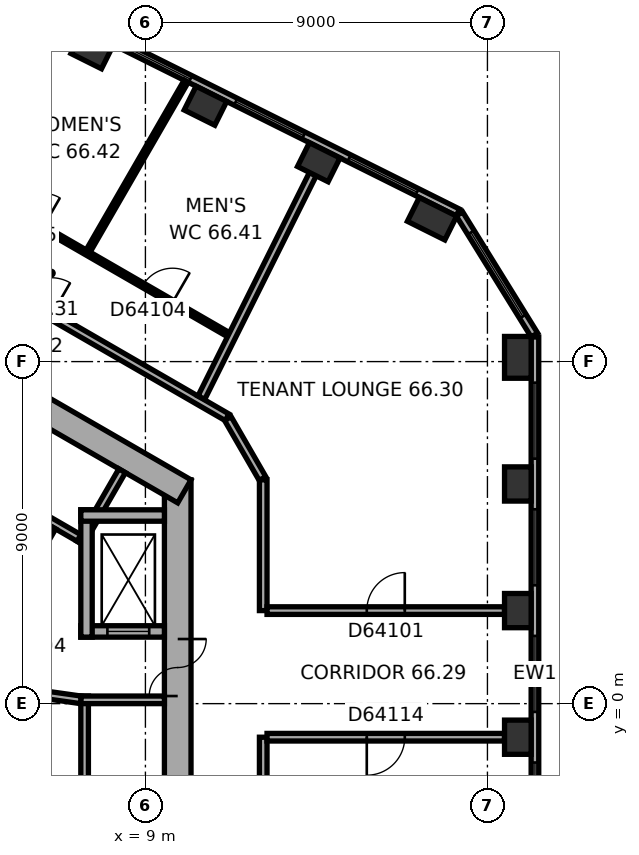
"""IFC4 building model, lengths in metres.
Left out: names, types, materials, properties, quantities, classifications, styles, units other than length and angle.
Written with IfcOpenShell. Run it as: python <this file> out.ifc"""

import sys

from ifc_helpers import new_model, si_unit, direction, frame, frame_2d, origin, origin_2d, place, context, subcontext, project, spatial, rectangle, extrude, element, fill, save


model = new_model("IFC4")
c1 = context("Model", 3, precision=1e-05, world=origin(), true_north=direction((0.0, 1.0)))
c2 = subcontext(c1, "Body", "Model", "MODEL_VIEW")
j1 = project(units=[si_unit("LENGTHUNIT", "METRE"), si_unit("PLANEANGLEUNIT", "RADIAN")], contexts=[c1])
p1 = place(None, origin())
s1 = spatial("IfcSite", under=j1, at=p1, CompositionType="ELEMENT")
p2 = place(p1, origin())
s2 = spatial("IfcBuilding", under=s1, at=p2, CompositionType="ELEMENT")
p3 = place(p2, frame((0.0, 0.0, 267.2)))
s3 = spatial("IfcBuildingStorey", under=s2, at=p3, CompositionType="ELEMENT", Elevation=267.2)
for number, where, z_axis, x_axis in (
    (1, (18.8, -0.883, 0.0), (0.0, 0.0, 1.0), (0.0, 1.0, 0.0)),
    (2, (18.8, 2.448, 0.0), (0.0, 0.0, 1.0), (0.0, 1.0, 0.0)),
    (3, (18.8, 5.78, 0.0), (0.0, 0.0, 1.0), (0.0, 1.0, 0.0)),
):
    element("IfcColumn", number, at=place(p3, frame(where, z_axis=z_axis, x_axis=x_axis)), inside=s3, PredefinedType="COLUMN", context=c2, shape_type="SweptSolid", body=[
        extrude(rectangle(XDim=0.9, YDim=0.7, at=origin_2d()), origin(), (0.0, 0.0, 1.0), 3.7),
    ])
for number, where, z_axis, x_axis in (
    (4, (18.8, 9.112, 0.0), (0.0, 0.0, 1.0), (0.0, 1.0, 0.0)),
    (5, (16.543, 12.759, 0.0), (0.0, 0.0, 1.0), (-0.895, 0.446, 0.0)),
):
    element("IfcColumn", number, at=place(p3, frame(where, z_axis=z_axis, x_axis=x_axis)), inside=s3, PredefinedType="COLUMN", context=c2, shape_type="SweptSolid", body=[
        extrude(rectangle(XDim=1.1, YDim=0.7, at=origin_2d()), origin(), (0.0, 0.0, 1.0), 3.7),
    ])
for number, where, z_axis, x_axis in (
    (6, (13.561, 14.246, 0.0), (0.0, 0.0, 1.0), (-0.895, 0.446, 0.0)),
    (7, (10.58, 15.732, 0.0), (0.0, 0.0, 1.0), (-0.895, 0.446, 0.0)),
    (8, (7.598, 17.219, 0.0), (0.0, 0.0, 1.0), (-0.895, 0.446, 0.0)),
):
    element("IfcColumn", number, at=place(p3, frame(where, z_axis=z_axis, x_axis=x_axis)), inside=s3, PredefinedType="COLUMN", context=c2, shape_type="SweptSolid", body=[
        extrude(rectangle(XDim=0.9, YDim=0.7, at=origin_2d()), origin(), (0.0, 0.0, 1.0), 3.7),
    ])
p4 = place(p3, frame((9.85, -5.889, 0.0), z_axis=(0.0, 0.0, 1.0), x_axis=(0.0, 1.0, 0.0)))
e9 = element("IfcWall", 9, at=p4, inside=s3, PredefinedType="SHEAR", context=c2, shape_type="SweptSolid", body=[
    extrude(rectangle(XDim=11.778, YDim=0.7, at=frame_2d((5.889, 0.0))), origin(), (0.0, 0.0, 1.0), 3.7),
])
p5 = place(p4, frame((6.089, 0.0, 0.0)))
e10 = element("IfcOpeningElement", 10, at=p5, cuts=e9, PredefinedType="OPENING", context=c2, shape_type="SweptSolid", body=[
    extrude(rectangle(XDim=1.5, YDim=2.1, at=frame_2d((0.75, 1.05))), frame((0.0, 0.36, 0.0), z_axis=(0.0, -1.0, 0.0), x_axis=(1.0, 0.0, 0.0)), (0.0, 0.0, 1.0), 0.72),
])
p6 = place(p4, frame((2.939, 0.0, 0.0)))
e11 = element("IfcOpeningElement", 11, at=p6, cuts=e9, PredefinedType="OPENING", context=c2, shape_type="SweptSolid", body=[
    extrude(rectangle(XDim=0.9, YDim=2.1, at=frame_2d((0.45, 1.05))), frame((0.0, 0.36, 0.0), z_axis=(0.0, -1.0, 0.0), x_axis=(1.0, 0.0, 0.0)), (0.0, 0.0, 1.0), 0.72),
])
p7 = place(p3, frame((10.025, 5.586, 0.0), z_axis=(0.0, 0.0, 1.0), x_axis=(-0.866026453023, 0.499998182661, 0.0)))
e12 = element("IfcWall", 12, at=p7, inside=s3, PredefinedType="SHEAR", context=c2, shape_type="SweptSolid", body=[
    extrude(rectangle(XDim=11.778, YDim=0.7, at=frame_2d((5.889, 0.0))), origin(), (0.0, 0.0, 1.0), 3.7),
])
p8 = place(p7, frame((5.139, 0.0, 0.0)))
e13 = element("IfcOpeningElement", 13, at=p8, cuts=e12, PredefinedType="OPENING", context=c2, shape_type="SweptSolid", body=[
    extrude(rectangle(XDim=0.9, YDim=2.1, at=frame_2d((0.45, 1.05))), frame((0.0, 0.36, 0.0), z_axis=(0.0, -1.0, 0.0), x_axis=(1.0, 0.0, 0.0)), (0.0, 0.0, 1.0), 0.72),
])
p9 = place(p3, frame((19.25, -8.084, 0.0), z_axis=(0.0, 0.0, 1.0), x_axis=(0.0, 1.0, 0.0)))
e14 = element("IfcWall", 14, at=p9, inside=s3, PredefinedType="STANDARD", context=c2, shape_type="SweptSolid", body=[
    extrude(rectangle(XDim=17.731, YDim=0.2, at=frame_2d((8.866, 0.0))), origin(), (0.0, 0.0, 1.0), 3.7),
])
p10 = place(p9, frame((1.203, 0.0, 0.9)))
e15 = element("IfcOpeningElement", 15, at=p10, cuts=e14, PredefinedType="OPENING", context=c2, shape_type="SweptSolid", body=[
    extrude(rectangle(XDim=2.0, YDim=2.0, at=frame_2d((1.0, 1.0))), frame((0.0, 0.11, 0.0), z_axis=(0.0, -1.0, 0.0), x_axis=(1.0, 0.0, 0.0)), (0.0, 0.0, 1.0), 0.22),
])
p11 = place(p9, frame((4.535, 0.0, 0.9)))
e16 = element("IfcOpeningElement", 16, at=p11, cuts=e14, PredefinedType="OPENING", context=c2, shape_type="SweptSolid", body=[
    extrude(rectangle(XDim=2.0, YDim=2.0, at=frame_2d((1.0, 1.0))), frame((0.0, 0.11, 0.0), z_axis=(0.0, -1.0, 0.0), x_axis=(1.0, 0.0, 0.0)), (0.0, 0.0, 1.0), 0.22),
])
p12 = place(p9, frame((7.866, 0.0, 0.9)))
e17 = element("IfcOpeningElement", 17, at=p12, cuts=e14, PredefinedType="OPENING", context=c2, shape_type="SweptSolid", body=[
    extrude(rectangle(XDim=2.0, YDim=2.0, at=frame_2d((1.0, 1.0))), frame((0.0, 0.11, 0.0), z_axis=(0.0, -1.0, 0.0), x_axis=(1.0, 0.0, 0.0)), (0.0, 0.0, 1.0), 0.22),
])
p13 = place(p9, frame((11.198, 0.0, 0.9)))
e18 = element("IfcOpeningElement", 18, at=p13, cuts=e14, PredefinedType="OPENING", context=c2, shape_type="SweptSolid", body=[
    extrude(rectangle(XDim=2.0, YDim=2.0, at=frame_2d((1.0, 1.0))), frame((0.0, 0.11, 0.0), z_axis=(0.0, -1.0, 0.0), x_axis=(1.0, 0.0, 0.0)), (0.0, 0.0, 1.0), 0.22),
])
p14 = place(p9, frame((14.53, 0.0, 0.9)))
e19 = element("IfcOpeningElement", 19, at=p14, cuts=e14, PredefinedType="OPENING", context=c2, shape_type="SweptSolid", body=[
    extrude(rectangle(XDim=2.0, YDim=2.0, at=frame_2d((1.0, 1.0))), frame((0.0, 0.11, 0.0), z_axis=(0.0, -1.0, 0.0), x_axis=(1.0, 0.0, 0.0)), (0.0, 0.0, 1.0), 0.22),
])
p15 = place(p3, frame((19.235, 9.7, 0.0), z_axis=(0.0, 0.0, 1.0), x_axis=(-0.526233475464, 0.850340125656, 0.0)))
e20 = element("IfcWall", 20, at=p15, inside=s3, PredefinedType="STANDARD", context=c2, shape_type="SweptSolid", body=[
    extrude(rectangle(XDim=3.747, YDim=0.2, at=frame_2d((1.874, 0.0))), origin(), (0.0, 0.0, 1.0), 3.7),
])
p16 = place(p15, frame((0.573, 0.0, 0.9)))
e21 = element("IfcOpeningElement", 21, at=p16, cuts=e20, PredefinedType="OPENING", context=c2, shape_type="SweptSolid", body=[
    extrude(rectangle(XDim=2.6, YDim=2.0, at=frame_2d((1.3, 1.0))), frame((0.0, 0.11, 0.0), z_axis=(0.0, -1.0, 0.0), x_axis=(1.0, 0.0, 0.0)), (0.0, 0.0, 1.0), 0.22),
])
p17 = place(p3, frame((17.223, 12.923, 0.0), z_axis=(0.0, 0.0, 1.0), x_axis=(-0.894930561148, 0.44620543556, 0.0)))
e22 = element("IfcWall", 22, at=p17, inside=s3, PredefinedType="STANDARD", context=c2, shape_type="SweptSolid", body=[
    extrude(rectangle(XDim=17.731, YDim=0.2, at=frame_2d((8.866, 0.0))), origin(), (0.0, 0.0, 1.0), 3.7),
])
p18 = place(p17, frame((1.202, 0.0, 0.9)))
e23 = element("IfcOpeningElement", 23, at=p18, cuts=e22, PredefinedType="OPENING", context=c2, shape_type="SweptSolid", body=[
    extrude(rectangle(XDim=2.0, YDim=2.0, at=frame_2d((1.0, 1.0))), frame((0.0, 0.11, 0.0), z_axis=(0.0, -1.0, 0.0), x_axis=(1.0, 0.0, 0.0)), (0.0, 0.0, 1.0), 0.22),
])
p19 = place(p17, frame((4.533, 0.0, 0.9)))
e24 = element("IfcOpeningElement", 24, at=p19, cuts=e22, PredefinedType="OPENING", context=c2, shape_type="SweptSolid", body=[
    extrude(rectangle(XDim=2.0, YDim=2.0, at=frame_2d((1.0, 1.0))), frame((0.0, 0.11, 0.0), z_axis=(0.0, -1.0, 0.0), x_axis=(1.0, 0.0, 0.0)), (0.0, 0.0, 1.0), 0.22),
])
p20 = place(p17, frame((7.865, 0.0, 0.9)))
e25 = element("IfcOpeningElement", 25, at=p20, cuts=e22, PredefinedType="OPENING", context=c2, shape_type="SweptSolid", body=[
    extrude(rectangle(XDim=2.0, YDim=2.0, at=frame_2d((1.0, 1.0))), frame((0.0, 0.11, 0.0), z_axis=(0.0, -1.0, 0.0), x_axis=(1.0, 0.0, 0.0)), (0.0, 0.0, 1.0), 0.22),
])
p21 = place(p17, frame((11.197, 0.0, 0.9)))
e26 = element("IfcOpeningElement", 26, at=p21, cuts=e22, PredefinedType="OPENING", context=c2, shape_type="SweptSolid", body=[
    extrude(rectangle(XDim=2.0, YDim=2.0, at=frame_2d((1.0, 1.0))), frame((0.0, 0.11, 0.0), z_axis=(0.0, -1.0, 0.0), x_axis=(1.0, 0.0, 0.0)), (0.0, 0.0, 1.0), 0.22),
])
p22 = place(p17, frame((14.528, 0.0, 0.9)))
e27 = element("IfcOpeningElement", 27, at=p22, cuts=e22, PredefinedType="OPENING", context=c2, shape_type="SweptSolid", body=[
    extrude(rectangle(XDim=2.0, YDim=2.0, at=frame_2d((1.0, 1.0))), frame((0.0, 0.11, 0.0), z_axis=(0.0, -1.0, 0.0), x_axis=(1.0, 0.0, 0.0)), (0.0, 0.0, 1.0), 0.22),
])
p23 = place(p3, frame((7.4, -5.2, 0.0), z_axis=(0.0, 0.0, 1.0), x_axis=(0.0, 1.0, 0.0)))
e28 = element("IfcWall", 28, at=p23, inside=s3, PredefinedType="PARTITIONING", context=c2, shape_type="SweptSolid", body=[
    extrude(rectangle(XDim=5.4, YDim=0.2, at=frame_2d((2.7, 0.0))), origin(), (0.0, 0.0, 1.0), 3.42),
])
p24 = place(p3, frame((7.3, 0.1, 0.0), z_axis=(0.0, 0.0, 1.0), x_axis=(1.0, 0.0, 0.0)))
e29 = element("IfcWall", 29, at=p24, inside=s3, PredefinedType="PARTITIONING", context=c2, shape_type="SweptSolid", body=[
    extrude(rectangle(XDim=2.2, YDim=0.2, at=frame_2d((1.1, 0.0))), origin(), (0.0, 0.0, 1.0), 3.42),
])
p25 = place(p3, frame((7.424, 4.259, 0.0), z_axis=(0.0, 0.0, 1.0), x_axis=(-0.866026010844, 0.49999894854, 0.0)))
e30 = element("IfcWall", 30, at=p25, inside=s3, PredefinedType="PARTITIONING", context=c2, shape_type="SweptSolid", body=[
    extrude(rectangle(XDim=8.0, YDim=0.2, at=frame_2d((4.0, 0.0))), origin(), (0.0, 0.0, 1.0), 3.42),
])
p26 = place(p3, frame((7.287, 4.222, 0.0), z_axis=(0.0, 0.0, 1.0), x_axis=(0.499946605688, 0.86605622881, 0.0)))
e31 = element("IfcWall", 31, at=p26, inside=s3, PredefinedType="PARTITIONING", context=c2, shape_type="SweptSolid", body=[
    extrude(rectangle(XDim=2.2, YDim=0.2, at=frame_2d((1.1, 0.0))), origin(), (0.0, 0.0, 1.0), 3.42),
])
p27 = place(p3, frame((4.158, 0.602, 0.0), z_axis=(0.0, 0.0, 1.0), x_axis=(0.499977259774, 0.866038532462, 0.0)))
e32 = element("IfcWall", 32, at=p27, inside=s3, PredefinedType="SHEAR", context=c2, shape_type="SweptSolid", body=[
    extrude(rectangle(XDim=4.7, YDim=0.3, at=frame_2d((2.35, 0.0))), origin(), (0.0, 0.0, 1.0), 3.42),
])
p28 = place(p27, frame((0.8, 0.0, 0.0)))
e33 = element("IfcOpeningElement", 33, at=p28, cuts=e32, PredefinedType="OPENING", context=c2, shape_type="SweptSolid", body=[
    extrude(rectangle(XDim=1.2, YDim=2.1, at=frame_2d((0.6, 1.05))), frame((0.0, 0.16, 0.0), z_axis=(0.0, -1.0, 0.0), x_axis=(1.0, 0.0, 0.0)), (0.0, 0.0, 1.0), 0.32),
])
p29 = place(p3, frame((4.816, -0.222, 0.0), z_axis=(0.0, 0.0, 1.0), x_axis=(0.499977259774, -0.866038532462, 0.0)))
e34 = element("IfcWall", 34, at=p29, inside=s3, PredefinedType="SHEAR", context=c2, shape_type="SweptSolid", body=[
    extrude(rectangle(XDim=4.7, YDim=0.3, at=frame_2d((2.35, 0.0))), origin(), (0.0, 0.0, 1.0), 3.42),
])
p30 = place(p3, frame((7.3, 1.9, 0.0), z_axis=(0.0, 0.0, 1.0), x_axis=(1.0, 0.0, 0.0)))
e35 = element("IfcWall", 35, at=p30, inside=s3, PredefinedType="SHEAR", context=c2, shape_type="SweptSolid", body=[
    extrude(rectangle(XDim=2.2, YDim=0.3, at=frame_2d((1.1, 0.0))), origin(), (0.0, 0.0, 1.0), 3.42),
])
p31 = place(p30, frame((0.7, 0.0, 0.0)))
e36 = element("IfcOpeningElement", 36, at=p31, cuts=e35, PredefinedType="OPENING", context=c2, shape_type="SweptSolid", body=[
    extrude(rectangle(XDim=1.1, YDim=2.1, at=frame_2d((0.55, 1.05))), frame((0.0, 0.16, 0.0), z_axis=(0.0, -1.0, 0.0), x_axis=(1.0, 0.0, 0.0)), (0.0, 0.0, 1.0), 0.32),
])
p32 = place(p3, frame((7.45, 1.75, 0.0), z_axis=(0.0, 0.0, 1.0), x_axis=(0.0, 1.0, 0.0)))
e37 = element("IfcWall", 37, at=p32, inside=s3, PredefinedType="SHEAR", context=c2, shape_type="SweptSolid", body=[
    extrude(rectangle(XDim=3.35, YDim=0.3, at=frame_2d((1.675, 0.0))), origin(), (0.0, 0.0, 1.0), 3.42),
])
p33 = place(p3, frame((7.3, 4.95, 0.0), z_axis=(0.0, 0.0, 1.0), x_axis=(1.0, 0.0, 0.0)))
e38 = element("IfcWall", 38, at=p33, inside=s3, PredefinedType="SHEAR", context=c2, shape_type="SweptSolid", body=[
    extrude(rectangle(XDim=2.2, YDim=0.3, at=frame_2d((1.1, 0.0))), origin(), (0.0, 0.0, 1.0), 3.42),
])
p34 = place(p3, frame((4.327, 0.521, 0.0), z_axis=(0.0, 0.0, 1.0), x_axis=(0.990124376366, -0.14019172346, 0.0)))
e39 = element("IfcWall", 39, at=p34, inside=s3, PredefinedType="PARTITIONING", context=c2, shape_type="SweptSolid", body=[
    extrude(rectangle(XDim=3.002, YDim=0.2, at=frame_2d((1.501, 0.0))), origin(), (0.0, 0.0, 1.0), 3.42),
])
p35 = place(p34, frame((1.15, 0.0, 0.0)))
e40 = element("IfcOpeningElement", 40, at=p35, cuts=e39, PredefinedType="OPENING", context=c2, shape_type="SweptSolid", body=[
    extrude(rectangle(XDim=0.9, YDim=2.1, at=frame_2d((0.45, 1.05))), frame((0.0, 0.11, 0.0), z_axis=(0.0, -1.0, 0.0), x_axis=(1.0, 0.0, 0.0)), (0.0, 0.0, 1.0), 0.22),
])
p36 = place(p3, frame((10.072, 16.376, 0.0), z_axis=(0.0, 0.0, 1.0), x_axis=(-0.499972385701, -0.86604134632, 0.0)))
e41 = element("IfcWall", 41, at=p36, inside=s3, PredefinedType="PARTITIONING", context=c2, shape_type="SweptSolid", body=[
    extrude(rectangle(XDim=5.158, YDim=0.12, at=frame_2d((2.579, 0.0))), origin(), (0.0, 0.0, 1.0), 2.87),
])
p37 = place(p3, frame((11.15, 7.534, 0.0), z_axis=(0.0, 0.0, 1.0), x_axis=(-0.866026603062, 0.499997922785, 0.0)))
e42 = element("IfcWall", 42, at=p37, inside=s3, PredefinedType="PARTITIONING", context=c2, shape_type="SweptSolid", body=[
    extrude(rectangle(XDim=11.738, YDim=0.2, at=frame_2d((5.869, 0.0))), origin(), (0.0, 0.0, 1.0), 3.42),
])
p38 = place(p37, frame((5.345, 0.0, 0.0)))
e43 = element("IfcOpeningElement", 43, at=p38, cuts=e42, PredefinedType="OPENING", context=c2, shape_type="SweptSolid", body=[
    extrude(rectangle(XDim=1.0, YDim=2.1, at=frame_2d((0.5, 1.05))), frame((0.0, 0.11, 0.0), z_axis=(0.0, -1.0, 0.0), x_axis=(1.0, 0.0, 0.0)), (0.0, 0.0, 1.0), 0.22),
])
p39 = place(p3, frame((11.187, 9.707, 0.0), z_axis=(0.0, 0.0, 1.0), x_axis=(-0.866033133531, 0.499986611447, 0.0)))
e44 = element("IfcWall", 44, at=p39, inside=s3, PredefinedType="PARTITIONING", context=c2, shape_type="SweptSolid", body=[
    extrude(rectangle(XDim=9.814, YDim=0.12, at=frame_2d((4.907, 0.0))), origin(), (0.0, 0.0, 1.0), 3.42),
])
p40 = place(p39, frame((8.349, 0.0, 0.0)))
e45 = element("IfcOpeningElement", 45, at=p40, cuts=e44, PredefinedType="OPENING", context=c2, shape_type="SweptSolid", body=[
    extrude(rectangle(XDim=1.0, YDim=2.1, at=frame_2d((0.5, 1.05))), frame((0.0, 0.07, 0.0), z_axis=(0.0, -1.0, 0.0), x_axis=(1.0, 0.0, 0.0)), (0.0, 0.0, 1.0), 0.14),
])
p41 = place(p39, frame((1.7, 0.0, 0.0)))
e46 = element("IfcOpeningElement", 46, at=p41, cuts=e44, PredefinedType="OPENING", context=c2, shape_type="SweptSolid", body=[
    extrude(rectangle(XDim=0.9, YDim=2.1, at=frame_2d((0.45, 1.05))), frame((0.0, 0.07, 0.0), z_axis=(0.0, -1.0, 0.0), x_axis=(1.0, 0.0, 0.0)), (0.0, 0.0, 1.0), 0.14),
])
p42 = place(p39, frame((5.642, 0.0, 0.0)))
e47 = element("IfcOpeningElement", 47, at=p42, cuts=e44, PredefinedType="OPENING", context=c2, shape_type="SweptSolid", body=[
    extrude(rectangle(XDim=0.9, YDim=2.1, at=frame_2d((0.45, 1.05))), frame((0.0, 0.07, 0.0), z_axis=(0.0, -1.0, 0.0), x_axis=(1.0, 0.0, 0.0)), (0.0, 0.0, 1.0), 0.14),
])
p43 = place(p3, frame((12.08, 5.924, 0.0), z_axis=(0.0, 0.0, 1.0), x_axis=(-0.500004960326, 0.86602253992, 0.0)))
e48 = element("IfcWall", 48, at=p43, inside=s3, PredefinedType="PARTITIONING", context=c2, shape_type="SweptSolid", body=[
    extrude(rectangle(XDim=1.82, YDim=0.2, at=frame_2d((0.91, 0.0))), origin(), (0.0, 0.0, 1.0), 3.42),
])
p44 = place(p3, frame((12.1, -5.849, 0.0), z_axis=(0.0, 0.0, 1.0), x_axis=(0.0, 1.0, 0.0)))
e49 = element("IfcWall", 49, at=p44, inside=s3, PredefinedType="PARTITIONING", context=c2, shape_type="SweptSolid", body=[
    extrude(rectangle(XDim=4.966, YDim=0.2, at=frame_2d((2.483, 0.0))), origin(), (0.0, 0.0, 1.0), 3.42),
])
p45 = place(p3, frame((12.1, 2.448, 0.0), z_axis=(0.0, 0.0, 1.0), x_axis=(0.0, 1.0, 0.0)))
e50 = element("IfcWall", 50, at=p45, inside=s3, PredefinedType="PARTITIONING", context=c2, shape_type="SweptSolid", body=[
    extrude(rectangle(XDim=3.441, YDim=0.2, at=frame_2d((1.72, 0.0))), origin(), (0.0, 0.0, 1.0), 3.42),
])
p46 = place(p3, frame((12.2, -0.883, 0.0), z_axis=(0.0, 0.0, 1.0), x_axis=(1.0, 0.0, 0.0)))
e51 = element("IfcWall", 51, at=p46, inside=s3, PredefinedType="PARTITIONING", context=c2, shape_type="SweptSolid", body=[
    extrude(rectangle(XDim=6.25, YDim=0.2, at=frame_2d((3.125, 0.0))), origin(), (0.0, 0.0, 1.0), 2.87),
])
p47 = place(p46, frame((2.625, 0.0, 0.0)))
e52 = element("IfcOpeningElement", 52, at=p47, cuts=e51, PredefinedType="OPENING", context=c2, shape_type="SweptSolid", body=[
    extrude(rectangle(XDim=1.0, YDim=2.1, at=frame_2d((0.5, 1.05))), frame((0.0, 0.11, 0.0), z_axis=(0.0, -1.0, 0.0), x_axis=(1.0, 0.0, 0.0)), (0.0, 0.0, 1.0), 0.22),
])
p48 = place(p3, frame((13.405, 13.933, 0.0), z_axis=(0.0, 0.0, 1.0), x_axis=(-0.446187838644, -0.894939334618, 0.0)))
e53 = element("IfcWall", 53, at=p48, inside=s3, PredefinedType="PARTITIONING", context=c2, shape_type="SweptSolid", body=[
    extrude(rectangle(XDim=6.571, YDim=0.2, at=frame_2d((3.286, 0.0))), origin(), (0.0, 0.0, 1.0), 3.42),
])
p49 = place(p3, frame((18.45, 2.448, 0.0), z_axis=(0.0, 0.0, 1.0), x_axis=(-1.0, 0.0, 0.0)))
e54 = element("IfcWall", 54, at=p49, inside=s3, PredefinedType="PARTITIONING", context=c2, shape_type="SweptSolid", body=[
    extrude(rectangle(XDim=6.25, YDim=0.2, at=frame_2d((3.125, 0.0))), origin(), (0.0, 0.0, 1.0), 3.42),
])
p50 = place(p49, frame((2.625, 0.0, 0.0)))
e55 = element("IfcOpeningElement", 55, at=p50, cuts=e54, PredefinedType="OPENING", context=c2, shape_type="SweptSolid", body=[
    extrude(rectangle(XDim=1.0, YDim=2.1, at=frame_2d((0.5, 1.05))), frame((0.0, 0.11, 0.0), z_axis=(0.0, -1.0, 0.0), x_axis=(1.0, 0.0, 0.0)), (0.0, 0.0, 1.0), 0.22),
])
p51 = place(p11, origin())
e56 = element("IfcWindow", 56, at=p51, inside=s3, PartitioningType="SINGLE_PANEL", PredefinedType="WINDOW", context=c2, shape_type="SweptSolid", body=[
    extrude(rectangle(XDim=2.0, YDim=2.0, at=frame_2d((1.0, 1.0))), frame((0.0, 0.03, 0.0), z_axis=(0.0, -1.0, 0.0), x_axis=(1.0, 0.0, 0.0)), (0.0, 0.0, 1.0), 0.06),
])
fill(e16, e56)
p52 = place(p12, origin())
e57 = element("IfcWindow", 57, at=p52, inside=s3, PartitioningType="SINGLE_PANEL", PredefinedType="WINDOW", context=c2, shape_type="SweptSolid", body=[
    extrude(rectangle(XDim=2.0, YDim=2.0, at=frame_2d((1.0, 1.0))), frame((0.0, 0.03, 0.0), z_axis=(0.0, -1.0, 0.0), x_axis=(1.0, 0.0, 0.0)), (0.0, 0.0, 1.0), 0.06),
])
fill(e17, e57)
p53 = place(p13, origin())
e58 = element("IfcWindow", 58, at=p53, inside=s3, PartitioningType="SINGLE_PANEL", PredefinedType="WINDOW", context=c2, shape_type="SweptSolid", body=[
    extrude(rectangle(XDim=2.0, YDim=2.0, at=frame_2d((1.0, 1.0))), frame((0.0, 0.03, 0.0), z_axis=(0.0, -1.0, 0.0), x_axis=(1.0, 0.0, 0.0)), (0.0, 0.0, 1.0), 0.06),
])
fill(e18, e58)
p54 = place(p14, origin())
e59 = element("IfcWindow", 59, at=p54, inside=s3, PartitioningType="SINGLE_PANEL", PredefinedType="WINDOW", context=c2, shape_type="SweptSolid", body=[
    extrude(rectangle(XDim=2.0, YDim=2.0, at=frame_2d((1.0, 1.0))), frame((0.0, 0.03, 0.0), z_axis=(0.0, -1.0, 0.0), x_axis=(1.0, 0.0, 0.0)), (0.0, 0.0, 1.0), 0.06),
])
fill(e19, e59)
p55 = place(p16, origin())
e60 = element("IfcWindow", 60, at=p55, inside=s3, PartitioningType="SINGLE_PANEL", PredefinedType="WINDOW", context=c2, shape_type="SweptSolid", body=[
    extrude(rectangle(XDim=2.6, YDim=2.0, at=frame_2d((1.3, 1.0))), frame((0.0, 0.03, 0.0), z_axis=(0.0, -1.0, 0.0), x_axis=(1.0, 0.0, 0.0)), (0.0, 0.0, 1.0), 0.06),
])
fill(e21, e60)
p56 = place(p18, origin())
e61 = element("IfcWindow", 61, at=p56, inside=s3, PartitioningType="SINGLE_PANEL", PredefinedType="WINDOW", context=c2, shape_type="SweptSolid", body=[
    extrude(rectangle(XDim=2.0, YDim=2.0, at=frame_2d((1.0, 1.0))), frame((0.0, 0.03, 0.0), z_axis=(0.0, -1.0, 0.0), x_axis=(1.0, 0.0, 0.0)), (0.0, 0.0, 1.0), 0.06),
])
fill(e23, e61)
p57 = place(p19, origin())
e62 = element("IfcWindow", 62, at=p57, inside=s3, PartitioningType="SINGLE_PANEL", PredefinedType="WINDOW", context=c2, shape_type="SweptSolid", body=[
    extrude(rectangle(XDim=2.0, YDim=2.0, at=frame_2d((1.0, 1.0))), frame((0.0, 0.03, 0.0), z_axis=(0.0, -1.0, 0.0), x_axis=(1.0, 0.0, 0.0)), (0.0, 0.0, 1.0), 0.06),
])
fill(e24, e62)
p58 = place(p20, origin())
e63 = element("IfcWindow", 63, at=p58, inside=s3, PartitioningType="SINGLE_PANEL", PredefinedType="WINDOW", context=c2, shape_type="SweptSolid", body=[
    extrude(rectangle(XDim=2.0, YDim=2.0, at=frame_2d((1.0, 1.0))), frame((0.0, 0.03, 0.0), z_axis=(0.0, -1.0, 0.0), x_axis=(1.0, 0.0, 0.0)), (0.0, 0.0, 1.0), 0.06),
])
fill(e25, e63)
p59 = place(p5, origin())
e64 = element("IfcDoor", 64, at=p59, inside=s3, OperationType="DOUBLE_DOOR_SINGLE_SWING", PredefinedType="DOOR", context=c2, shape_type="SweptSolid", body=[
    extrude(rectangle(XDim=1.5, YDim=2.1, at=frame_2d((0.75, 1.05))), frame((0.0, 0.025, 0.0), z_axis=(0.0, -1.0, 0.0), x_axis=(1.0, 0.0, 0.0)), (0.0, 0.0, 1.0), 0.05),
])
fill(e10, e64)
p60 = place(p31, origin())
e65 = element("IfcDoor", 65, at=p60, inside=s3, OperationType="DOUBLE_DOOR_SLIDING", PredefinedType="DOOR", context=c2, shape_type="SweptSolid", body=[
    extrude(rectangle(XDim=1.1, YDim=2.1, at=frame_2d((0.55, 1.05))), frame((0.0, 0.025, 0.0), z_axis=(0.0, -1.0, 0.0), x_axis=(1.0, 0.0, 0.0)), (0.0, 0.0, 1.0), 0.05),
])
fill(e36, e65)
p61 = place(p50, origin())
e66 = element("IfcDoor", 66, at=p61, inside=s3, OperationType="SINGLE_SWING_LEFT", PredefinedType="DOOR", context=c2, shape_type="SweptSolid", body=[
    extrude(rectangle(XDim=1.0, YDim=2.1, at=frame_2d((0.5, 1.05))), frame((0.0, 0.025, 0.0), z_axis=(0.0, -1.0, 0.0), x_axis=(1.0, 0.0, 0.0)), (0.0, 0.0, 1.0), 0.05),
])
fill(e55, e66)
p62 = place(p41, origin())
e67 = element("IfcDoor", 67, at=p62, inside=s3, OperationType="SINGLE_SWING_LEFT", PredefinedType="DOOR", context=c2, shape_type="SweptSolid", body=[
    extrude(rectangle(XDim=0.9, YDim=2.1, at=frame_2d((0.45, 1.05))), frame((0.0, 0.025, 0.0), z_axis=(0.0, -1.0, 0.0), x_axis=(1.0, 0.0, 0.0)), (0.0, 0.0, 1.0), 0.05),
])
fill(e46, e67)
p63 = place(p47, origin())
e68 = element("IfcDoor", 68, at=p63, inside=s3, OperationType="SINGLE_SWING_LEFT", PredefinedType="DOOR", context=c2, shape_type="SweptSolid", body=[
    extrude(rectangle(XDim=1.0, YDim=2.1, at=frame_2d((0.5, 1.05))), frame((0.0, 0.025, 0.0), z_axis=(0.0, -1.0, 0.0), x_axis=(1.0, 0.0, 0.0)), (0.0, 0.0, 1.0), 0.05),
])
fill(e52, e68)
save(model, sys.argv[1])
